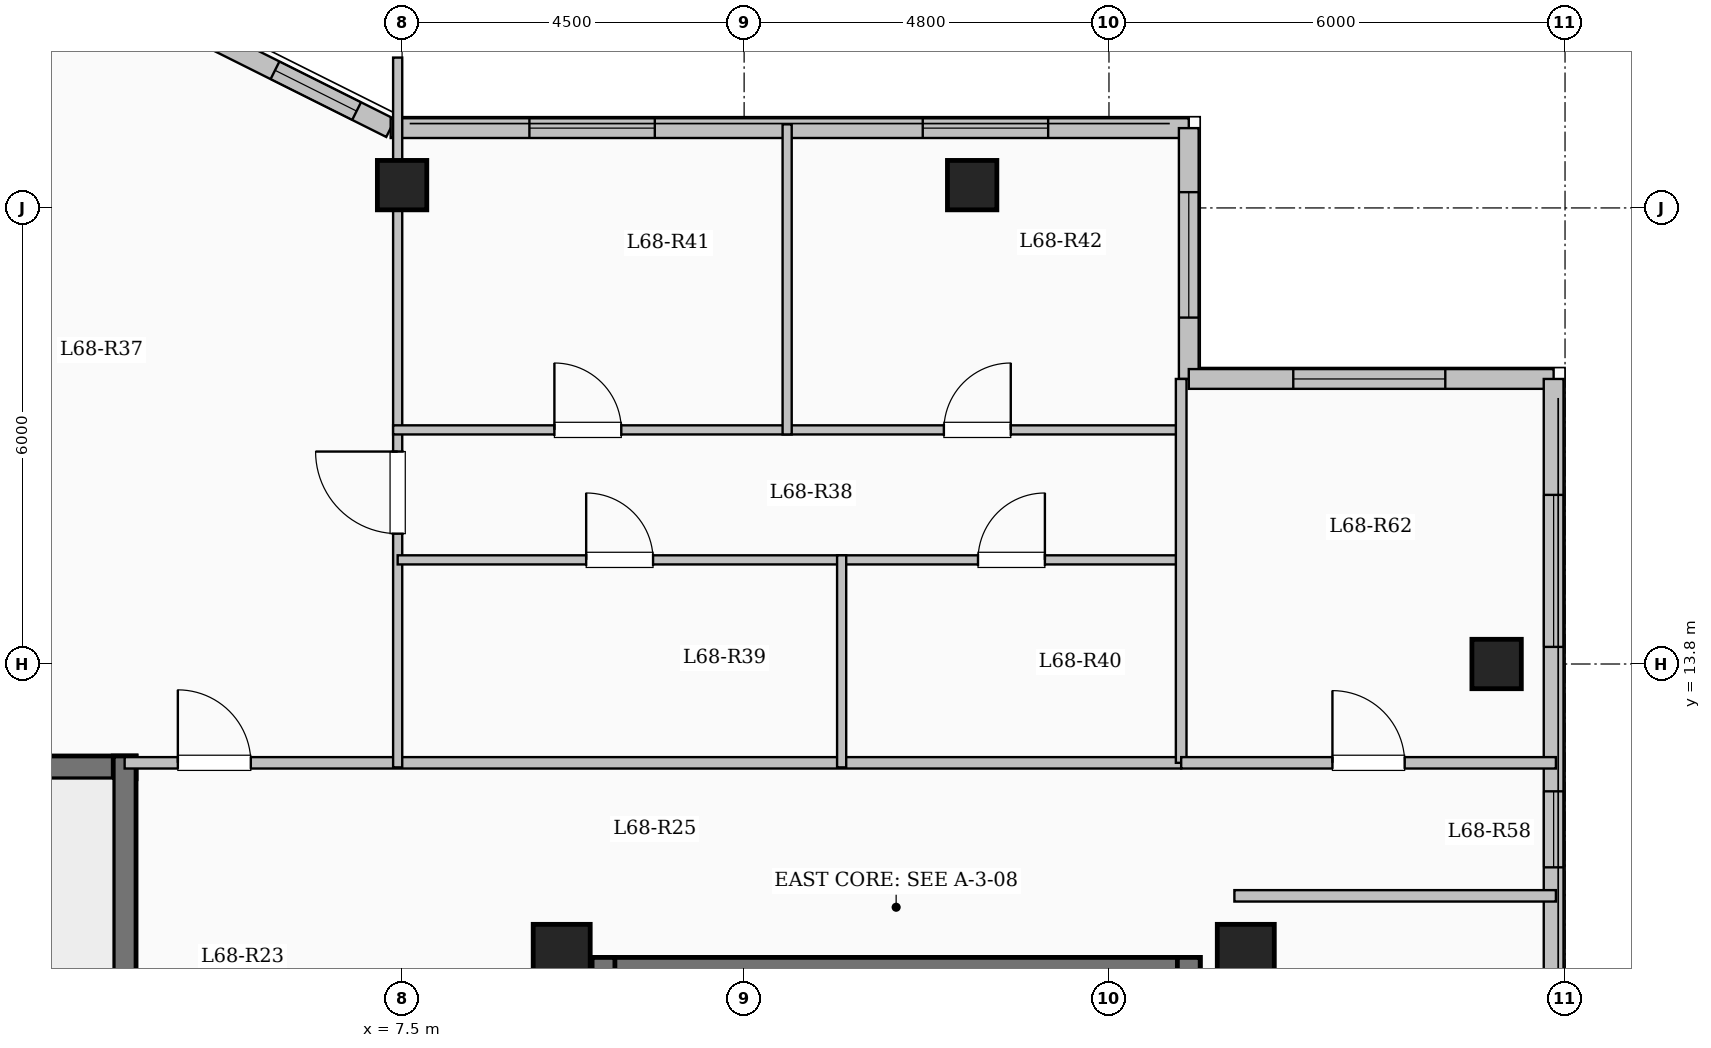
"""IFC4 building model, lengths in metres.
Left out: names, types, materials, properties, quantities, classifications, styles, units other than length and angle.
Written with IfcOpenShell. Run it as: python <this file> out.ifc"""

import sys

from ifc_helpers import new_model, si_unit, direction, frame, frame_2d, origin, origin_2d, place, context, subcontext, project, spatial, rectangle, extrude, element, fill, save


model = new_model("IFC4")
c1 = context("Model", 3, precision=1e-05, world=origin(), true_north=direction((0.0, 1.0)))
c2 = subcontext(c1, "Body", "Model", "MODEL_VIEW")
j1 = project(units=[si_unit("LENGTHUNIT", "METRE"), si_unit("PLANEANGLEUNIT", "RADIAN")], contexts=[c1])
p1 = place(None, origin())
s1 = spatial("IfcSite", under=j1, at=p1, CompositionType="ELEMENT")
p2 = place(p1, origin())
s2 = spatial("IfcBuilding", under=s1, at=p2, CompositionType="ELEMENT")
p3 = place(p2, frame((0.0, 0.0, 251.55)))
s3 = spatial("IfcBuildingStorey", under=s2, at=p3, CompositionType="ELEMENT", Elevation=251.55)
for number, where, z_axis, x_axis in (
    (1, (9.6, 10.0, 0.0), (0.0, 0.0, 1.0), (1.0, 0.0, 0.0)),
    (2, (18.6, 10.0, 0.0), (0.0, 0.0, 1.0), (1.0, 0.0, 0.0)),
):
    element("IfcColumn", number, at=place(p3, frame(where, z_axis=z_axis, x_axis=x_axis)), inside=s3, PredefinedType="COLUMN", context=c2, shape_type="SweptSolid", body=[
        extrude(rectangle(XDim=0.75, YDim=0.75, at=origin_2d()), origin(), (0.0, 0.0, 1.0), 3.35),
    ])
for number, where, z_axis, x_axis in (
    (3, (7.5, 20.1, 0.0), (0.0, 0.0, 1.0), (1.0, 0.0, 0.0)),
    (4, (15.0, 20.1, 0.0), (0.0, 0.0, 1.0), (1.0, 0.0, 0.0)),
    (5, (21.9, 13.8, 0.0), (0.0, 0.0, 1.0), (1.0, 0.0, 0.0)),
):
    element("IfcColumn", number, at=place(p3, frame(where, z_axis=z_axis, x_axis=x_axis)), inside=s3, PredefinedType="COLUMN", context=c2, shape_type="SweptSolid", body=[
        extrude(rectangle(XDim=0.65, YDim=0.65, at=origin_2d()), origin(), (0.0, 0.0, 1.0), 3.35),
    ])
p4 = place(p3, frame((4.35, 22.35, 0.0), z_axis=(0.0, 0.0, 1.0), x_axis=(0.894427191, -0.4472135955, 0.0)))
e6 = element("IfcWall", 6, at=p4, inside=s3, PredefinedType="SOLIDWALL", context=c2, shape_type="SweptSolid", body=[
    extrude(rectangle(XDim=3.354, YDim=0.26, at=frame_2d((1.677, 0.0))), origin(), (0.0, 0.0, 1.0), 3.1),
])
p5 = place(p4, frame((1.653, 0.0, 0.95)))
e7 = element("IfcOpeningElement", 7, at=p5, cuts=e6, PredefinedType="OPENING", context=c2, shape_type="SweptSolid", body=[
    extrude(rectangle(XDim=1.2, YDim=1.5, at=frame_2d((0.6, 0.75))), frame((0.0, 0.14, 0.0), z_axis=(0.0, -1.0, 0.0), x_axis=(1.0, 0.0, 0.0)), (0.0, 0.0, 1.0), 0.28),
])
p6 = place(p3, frame((7.35, 20.85, 0.0), z_axis=(0.0, 0.0, 1.0), x_axis=(1.0, 0.0, 0.0)))
e8 = element("IfcWall", 8, at=p6, inside=s3, PredefinedType="SOLIDWALL", context=c2, shape_type="SweptSolid", body=[
    extrude(rectangle(XDim=10.5, YDim=0.26, at=frame_2d((5.25, 0.0))), origin(), (0.0, 0.0, 1.0), 3.1),
])
p7 = place(p6, frame((1.825, 0.0, 0.9)))
e9 = element("IfcOpeningElement", 9, at=p7, cuts=e8, PredefinedType="OPENING", context=c2, shape_type="SweptSolid", body=[
    extrude(rectangle(XDim=1.65, YDim=1.6, at=frame_2d((0.825, 0.8))), frame((0.0, 0.14, 0.0), z_axis=(0.0, -1.0, 0.0), x_axis=(1.0, 0.0, 0.0)), (0.0, 0.0, 1.0), 0.28),
])
p8 = place(p6, frame((7.0, 0.0, 0.9)))
e10 = element("IfcOpeningElement", 10, at=p8, cuts=e8, PredefinedType="OPENING", context=c2, shape_type="SweptSolid", body=[
    extrude(rectangle(XDim=1.65, YDim=1.6, at=frame_2d((0.825, 0.8))), frame((0.0, 0.14, 0.0), z_axis=(0.0, -1.0, 0.0), x_axis=(1.0, 0.0, 0.0)), (0.0, 0.0, 1.0), 0.28),
])
p9 = place(p3, frame((17.85, 20.85, 0.0), z_axis=(0.0, 0.0, 1.0), x_axis=(0.0, -1.0, 0.0)))
e11 = element("IfcWall", 11, at=p9, inside=s3, PredefinedType="SOLIDWALL", context=c2, shape_type="SweptSolid", body=[
    extrude(rectangle(XDim=3.3, YDim=0.26, at=frame_2d((1.65, 0.0))), origin(), (0.0, 0.0, 1.0), 3.1),
])
p10 = place(p9, frame((0.843, 0.0, 0.9)))
e12 = element("IfcOpeningElement", 12, at=p10, cuts=e11, PredefinedType="OPENING", context=c2, shape_type="SweptSolid", body=[
    extrude(rectangle(XDim=1.65, YDim=1.6, at=frame_2d((0.825, 0.8))), frame((0.0, 0.14, 0.0), z_axis=(0.0, -1.0, 0.0), x_axis=(1.0, 0.0, 0.0)), (0.0, 0.0, 1.0), 0.28),
])
p11 = place(p3, frame((17.85, 17.55, 0.0), z_axis=(0.0, 0.0, 1.0), x_axis=(1.0, 0.0, 0.0)))
e13 = element("IfcWall", 13, at=p11, inside=s3, PredefinedType="SOLIDWALL", context=c2, shape_type="SweptSolid", body=[
    extrude(rectangle(XDim=4.8, YDim=0.26, at=frame_2d((2.4, 0.0))), origin(), (0.0, 0.0, 1.0), 3.1),
])
p12 = place(p11, frame((1.375, 0.0, 0.9)))
e14 = element("IfcOpeningElement", 14, at=p12, cuts=e13, PredefinedType="OPENING", context=c2, shape_type="SweptSolid", body=[
    extrude(rectangle(XDim=2.0, YDim=1.7, at=frame_2d((1.0, 0.85))), frame((0.0, 0.14, 0.0), z_axis=(0.0, -1.0, 0.0), x_axis=(1.0, 0.0, 0.0)), (0.0, 0.0, 1.0), 0.28),
])
p13 = place(p3, frame((22.65, 17.55, 0.0), z_axis=(0.0, 0.0, 1.0), x_axis=(0.0, -1.0, 0.0)))
e15 = element("IfcWall", 15, at=p13, inside=s3, PredefinedType="SOLIDWALL", context=c2, shape_type="SweptSolid", body=[
    extrude(rectangle(XDim=35.1, YDim=0.26, at=frame_2d((17.55, 0.0))), origin(), (0.0, 0.0, 1.0), 3.1),
])
p14 = place(p13, frame((1.525, 0.0, 0.9)))
e16 = element("IfcOpeningElement", 16, at=p14, cuts=e15, PredefinedType="OPENING", context=c2, shape_type="SweptSolid", body=[
    extrude(rectangle(XDim=2.0, YDim=1.7, at=frame_2d((1.0, 0.85))), frame((0.0, 0.14, 0.0), z_axis=(0.0, -1.0, 0.0), x_axis=(1.0, 0.0, 0.0)), (0.0, 0.0, 1.0), 0.28),
])
p15 = place(p13, frame((5.425, 0.0, 0.95)))
e17 = element("IfcOpeningElement", 17, at=p15, cuts=e15, PredefinedType="OPENING", context=c2, shape_type="SweptSolid", body=[
    extrude(rectangle(XDim=1.0, YDim=1.5, at=frame_2d((0.5, 0.75))), frame((0.0, 0.14, 0.0), z_axis=(0.0, -1.0, 0.0), x_axis=(1.0, 0.0, 0.0)), (0.0, 0.0, 1.0), 0.28),
])
p16 = place(p13, frame((14.8, 0.0, 0.9)))
e18 = element("IfcOpeningElement", 18, at=p16, cuts=e15, PredefinedType="OPENING", context=c2, shape_type="SweptSolid", body=[
    extrude(rectangle(XDim=2.0, YDim=1.7, at=frame_2d((1.0, 0.85))), frame((0.0, 0.14, 0.0), z_axis=(0.0, -1.0, 0.0), x_axis=(1.0, 0.0, 0.0)), (0.0, 0.0, 1.0), 0.28),
])
p17 = place(p13, frame((25.275, 0.0, 0.95)))
e19 = element("IfcOpeningElement", 19, at=p17, cuts=e15, PredefinedType="OPENING", context=c2, shape_type="SweptSolid", body=[
    extrude(rectangle(XDim=1.2, YDim=1.5, at=frame_2d((0.6, 0.75))), frame((0.0, 0.14, 0.0), z_axis=(0.0, -1.0, 0.0), x_axis=(1.0, 0.0, 0.0)), (0.0, 0.0, 1.0), 0.28),
])
p18 = place(p13, frame((29.925, 0.0, 0.9)))
e20 = element("IfcOpeningElement", 20, at=p18, cuts=e15, PredefinedType="OPENING", context=c2, shape_type="SweptSolid", body=[
    extrude(rectangle(XDim=2.2, YDim=1.75, at=frame_2d((1.1, 0.875))), frame((0.0, 0.14, 0.0), z_axis=(0.0, -1.0, 0.0), x_axis=(1.0, 0.0, 0.0)), (0.0, 0.0, 1.0), 0.28),
])
p19 = place(p3, frame((10.0, 9.79, 0.0), z_axis=(0.0, 0.0, 1.0), x_axis=(1.0, 0.0, 0.0)))
e21 = element("IfcWall", 21, at=p19, inside=s3, PredefinedType="SHEAR", context=c2, shape_type="SweptSolid", body=[
    extrude(rectangle(XDim=8.0, YDim=0.3, at=frame_2d((4.0, 0.0))), origin(), (0.0, 0.0, 1.0), 3.35),
])
for number, where, z_axis, x_axis in (
    (22, (10.15, 6.35, 0.0), (0.0, 0.0, 1.0), (0.0, 1.0, 0.0)),
    (23, (17.85, 6.35, 0.0), (0.0, 0.0, 1.0), (0.0, 1.0, 0.0)),
):
    element("IfcWall", number, at=place(p3, frame(where, z_axis=z_axis, x_axis=x_axis)), inside=s3, PredefinedType="SHEAR", context=c2, shape_type="SweptSolid", body=[
        extrude(rectangle(XDim=3.59, YDim=0.3, at=frame_2d((1.795, 0.0))), origin(), (0.0, 0.0, 1.0), 3.35),
    ])
p20 = place(p3, frame((-4.0, 12.44, 0.0), z_axis=(0.0, 0.0, 1.0), x_axis=(1.0, 0.0, 0.0)))
e24 = element("IfcWall", 24, at=p20, inside=s3, PredefinedType="SHEAR", context=c2, shape_type="SweptSolid", body=[
    extrude(rectangle(XDim=8.0, YDim=0.3, at=frame_2d((4.0, 0.0))), origin(), (0.0, 0.0, 1.0), 3.35),
])
p21 = place(p3, frame((3.85, 9.0, 0.0), z_axis=(0.0, 0.0, 1.0), x_axis=(0.0, 1.0, 0.0)))
e25 = element("IfcWall", 25, at=p21, inside=s3, PredefinedType="SHEAR", context=c2, shape_type="SweptSolid", body=[
    extrude(rectangle(XDim=3.59, YDim=0.3, at=frame_2d((1.795, 0.0))), origin(), (0.0, 0.0, 1.0), 3.35),
])
p22 = place(p3, frame((3.85, 12.5, 0.0), z_axis=(0.0, 0.0, 1.0), x_axis=(1.0, 0.0, 0.0)))
e26 = element("IfcWall", 26, at=p22, inside=s3, PredefinedType="PARTITIONING", context=c2, shape_type="SweptSolid", body=[
    extrude(rectangle(XDim=13.9, YDim=0.15, at=frame_2d((6.95, 0.0))), origin(), (0.0, 0.0, 1.0), 3.1),
])
p23 = place(p22, frame((0.7, 0.0, 0.0)))
e27 = element("IfcOpeningElement", 27, at=p23, cuts=e26, PredefinedType="OPENING", context=c2, shape_type="SweptSolid", body=[
    extrude(rectangle(XDim=0.96, YDim=2.15, at=frame_2d((0.48, 1.075))), frame((0.0, 0.085, 0.0), z_axis=(0.0, -1.0, 0.0), x_axis=(1.0, 0.0, 0.0)), (0.0, 0.0, 1.0), 0.17),
])
p24 = place(p3, frame((7.442, 12.44, 0.0), z_axis=(0.0, 0.0, 1.0), x_axis=(0.0, 1.0, 0.0)))
e28 = element("IfcWall", 28, at=p24, inside=s3, PredefinedType="PARTITIONING", context=c2, shape_type="SweptSolid", body=[
    extrude(rectangle(XDim=9.338, YDim=0.12, at=frame_2d((4.669, 0.0))), origin(), (0.0, 0.0, 1.0), 2.685),
])
p25 = place(p24, frame((3.075, 0.0, 0.0)))
e29 = element("IfcOpeningElement", 29, at=p25, cuts=e28, PredefinedType="OPENING", context=c2, shape_type="SweptSolid", body=[
    extrude(rectangle(XDim=1.08, YDim=2.15, at=frame_2d((0.54, 1.075))), frame((0.0, 0.07, 0.0), z_axis=(0.0, -1.0, 0.0), x_axis=(1.0, 0.0, 0.0)), (0.0, 0.0, 1.0), 0.14),
])
p26 = place(p3, frame((7.442, 15.17, 0.0), z_axis=(0.0, 0.0, 1.0), x_axis=(1.0, 0.0, 0.0)))
e30 = element("IfcWall", 30, at=p26, inside=s3, PredefinedType="PARTITIONING", context=c2, shape_type="SweptSolid", body=[
    extrude(rectangle(XDim=5.841, YDim=0.12, at=frame_2d((2.92, 0.0))), origin(), (0.0, 0.0, 1.0), 3.1),
])
p27 = place(p26, frame((2.48, 0.0, 0.0)))
e31 = element("IfcOpeningElement", 31, at=p27, cuts=e30, PredefinedType="OPENING", context=c2, shape_type="SweptSolid", body=[
    extrude(rectangle(XDim=0.88, YDim=2.1, at=frame_2d((0.44, 1.05))), frame((0.0, 0.07, 0.0), z_axis=(0.0, -1.0, 0.0), x_axis=(1.0, 0.0, 0.0)), (0.0, 0.0, 1.0), 0.14),
])
p28 = place(p3, frame((13.283, 15.17, 0.0), z_axis=(0.0, 0.0, 1.0), x_axis=(1.0, 0.0, 0.0)))
e32 = element("IfcWall", 32, at=p28, inside=s3, PredefinedType="PARTITIONING", context=c2, shape_type="SweptSolid", body=[
    extrude(rectangle(XDim=4.467, YDim=0.12, at=frame_2d((2.233, 0.0))), origin(), (0.0, 0.0, 1.0), 3.1),
])
p29 = place(p28, frame((1.794, 0.0, 0.0)))
e33 = element("IfcOpeningElement", 33, at=p29, cuts=e32, PredefinedType="OPENING", context=c2, shape_type="SweptSolid", body=[
    extrude(rectangle(XDim=0.88, YDim=2.1, at=frame_2d((0.44, 1.05))), frame((0.0, 0.07, 0.0), z_axis=(0.0, -1.0, 0.0), x_axis=(1.0, 0.0, 0.0)), (0.0, 0.0, 1.0), 0.14),
])
p30 = place(p3, frame((7.382, 16.88, 0.0), z_axis=(0.0, 0.0, 1.0), x_axis=(1.0, 0.0, 0.0)))
e34 = element("IfcWall", 34, at=p30, inside=s3, PredefinedType="PARTITIONING", context=c2, shape_type="SweptSolid", body=[
    extrude(rectangle(XDim=10.428, YDim=0.12, at=frame_2d((5.214, 0.0))), origin(), (0.0, 0.0, 1.0), 2.785),
])
p31 = place(p30, frame((2.122, 0.0, 0.0)))
e35 = element("IfcOpeningElement", 35, at=p31, cuts=e34, PredefinedType="OPENING", context=c2, shape_type="SweptSolid", body=[
    extrude(rectangle(XDim=0.88, YDim=2.1, at=frame_2d((0.44, 1.05))), frame((0.0, 0.07, 0.0), z_axis=(0.0, -1.0, 0.0), x_axis=(1.0, 0.0, 0.0)), (0.0, 0.0, 1.0), 0.14),
])
p32 = place(p30, frame((7.246, 0.0, 0.0)))
e36 = element("IfcOpeningElement", 36, at=p32, cuts=e34, PredefinedType="OPENING", context=c2, shape_type="SweptSolid", body=[
    extrude(rectangle(XDim=0.88, YDim=2.1, at=frame_2d((0.44, 1.05))), frame((0.0, 0.07, 0.0), z_axis=(0.0, -1.0, 0.0), x_axis=(1.0, 0.0, 0.0)), (0.0, 0.0, 1.0), 0.14),
])
p33 = place(p3, frame((13.283, 12.44, 0.0), z_axis=(0.0, 0.0, 1.0), x_axis=(0.0, 1.0, 0.0)))
e37 = element("IfcWall", 37, at=p33, inside=s3, PredefinedType="PARTITIONING", context=c2, shape_type="SweptSolid", body=[
    extrude(rectangle(XDim=2.79, YDim=0.12, at=frame_2d((1.395, 0.0))), origin(), (0.0, 0.0, 1.0), 3.1),
])
p34 = place(p3, frame((12.566, 16.82, 0.0), z_axis=(0.0, 0.0, 1.0), x_axis=(0.0, 1.0, 0.0)))
e38 = element("IfcWall", 38, at=p34, inside=s3, PredefinedType="PARTITIONING", context=c2, shape_type="SweptSolid", body=[
    extrude(rectangle(XDim=4.08, YDim=0.12, at=frame_2d((2.04, 0.0))), origin(), (0.0, 0.0, 1.0), 3.1),
])
p35 = place(p3, frame((18.45, 10.75, 0.0), z_axis=(0.0, 0.0, 1.0), x_axis=(1.0, 0.0, 0.0)))
e39 = element("IfcWall", 39, at=p35, inside=s3, PredefinedType="PARTITIONING", context=c2, shape_type="SweptSolid", body=[
    extrude(rectangle(XDim=4.23, YDim=0.15, at=frame_2d((2.115, 0.0))), origin(), (0.0, 0.0, 1.0), 3.1),
])
p36 = place(p3, frame((17.75, 12.5, 0.0), z_axis=(0.0, 0.0, 1.0), x_axis=(0.0, 1.0, 0.0)))
e40 = element("IfcWall", 40, at=p36, inside=s3, PredefinedType="PARTITIONING", context=c2, shape_type="SweptSolid", body=[
    extrude(rectangle(XDim=5.05, YDim=0.14, at=frame_2d((2.525, 0.0))), origin(), (0.0, 0.0, 1.0), 3.1),
])
p37 = place(p3, frame((17.75, 12.5, 0.0), z_axis=(0.0, 0.0, 1.0), x_axis=(1.0, 0.0, 0.0)))
e41 = element("IfcWall", 41, at=p37, inside=s3, PredefinedType="PARTITIONING", context=c2, shape_type="SweptSolid", body=[
    extrude(rectangle(XDim=4.93, YDim=0.15, at=frame_2d((2.465, 0.0))), origin(), (0.0, 0.0, 1.0), 3.1),
])
p38 = place(p37, frame((1.99, 0.0, 0.0)))
e42 = element("IfcOpeningElement", 42, at=p38, cuts=e41, PredefinedType="OPENING", context=c2, shape_type="SweptSolid", body=[
    extrude(rectangle(XDim=0.95, YDim=2.15, at=frame_2d((0.475, 1.075))), frame((0.0, 0.085, 0.0), z_axis=(0.0, -1.0, 0.0), x_axis=(1.0, 0.0, 0.0)), (0.0, 0.0, 1.0), 0.17),
])
p39 = place(p5, origin())
e43 = element("IfcWindow", 43, at=p39, inside=s3, PartitioningType="SINGLE_PANEL", PredefinedType="WINDOW", context=c2, shape_type="SweptSolid", body=[
    extrude(rectangle(XDim=1.2, YDim=1.5, at=frame_2d((0.6, 0.75))), frame((0.0, 0.03, 0.0), z_axis=(0.0, -1.0, 0.0), x_axis=(1.0, 0.0, 0.0)), (0.0, 0.0, 1.0), 0.06),
])
fill(e7, e43)
p40 = place(p7, origin())
e44 = element("IfcWindow", 44, at=p40, inside=s3, PartitioningType="SINGLE_PANEL", PredefinedType="WINDOW", context=c2, shape_type="SweptSolid", body=[
    extrude(rectangle(XDim=1.65, YDim=1.6, at=frame_2d((0.825, 0.8))), frame((0.0, 0.03, 0.0), z_axis=(0.0, -1.0, 0.0), x_axis=(1.0, 0.0, 0.0)), (0.0, 0.0, 1.0), 0.06),
])
fill(e9, e44)
p41 = place(p8, origin())
e45 = element("IfcWindow", 45, at=p41, inside=s3, PartitioningType="SINGLE_PANEL", PredefinedType="WINDOW", context=c2, shape_type="SweptSolid", body=[
    extrude(rectangle(XDim=1.65, YDim=1.6, at=frame_2d((0.825, 0.8))), frame((0.0, 0.03, 0.0), z_axis=(0.0, -1.0, 0.0), x_axis=(1.0, 0.0, 0.0)), (0.0, 0.0, 1.0), 0.06),
])
fill(e10, e45)
p42 = place(p10, origin())
e46 = element("IfcWindow", 46, at=p42, inside=s3, PartitioningType="SINGLE_PANEL", PredefinedType="WINDOW", context=c2, shape_type="SweptSolid", body=[
    extrude(rectangle(XDim=1.65, YDim=1.6, at=frame_2d((0.825, 0.8))), frame((0.0, 0.03, 0.0), z_axis=(0.0, -1.0, 0.0), x_axis=(1.0, 0.0, 0.0)), (0.0, 0.0, 1.0), 0.06),
])
fill(e12, e46)
p43 = place(p12, origin())
e47 = element("IfcWindow", 47, at=p43, inside=s3, PartitioningType="SINGLE_PANEL", PredefinedType="WINDOW", context=c2, shape_type="SweptSolid", body=[
    extrude(rectangle(XDim=2.0, YDim=1.7, at=frame_2d((1.0, 0.85))), frame((0.0, 0.03, 0.0), z_axis=(0.0, -1.0, 0.0), x_axis=(1.0, 0.0, 0.0)), (0.0, 0.0, 1.0), 0.06),
])
fill(e14, e47)
p44 = place(p14, origin())
e48 = element("IfcWindow", 48, at=p44, inside=s3, PartitioningType="SINGLE_PANEL", PredefinedType="WINDOW", context=c2, shape_type="SweptSolid", body=[
    extrude(rectangle(XDim=2.0, YDim=1.7, at=frame_2d((1.0, 0.85))), frame((0.0, 0.03, 0.0), z_axis=(0.0, -1.0, 0.0), x_axis=(1.0, 0.0, 0.0)), (0.0, 0.0, 1.0), 0.06),
])
fill(e16, e48)
p45 = place(p15, origin())
e49 = element("IfcWindow", 49, at=p45, inside=s3, PartitioningType="SINGLE_PANEL", PredefinedType="WINDOW", context=c2, shape_type="SweptSolid", body=[
    extrude(rectangle(XDim=1.0, YDim=1.5, at=frame_2d((0.5, 0.75))), frame((0.0, 0.03, 0.0), z_axis=(0.0, -1.0, 0.0), x_axis=(1.0, 0.0, 0.0)), (0.0, 0.0, 1.0), 0.06),
])
fill(e17, e49)
p46 = place(p23, origin())
e50 = element("IfcDoor", 50, at=p46, inside=s3, OperationType="SINGLE_SWING_LEFT", PredefinedType="DOOR", context=c2, shape_type="SweptSolid", body=[
    extrude(rectangle(XDim=0.96, YDim=2.15, at=frame_2d((0.48, 1.075))), frame((0.0, 0.025, 0.0), z_axis=(0.0, -1.0, 0.0), x_axis=(1.0, 0.0, 0.0)), (0.0, 0.0, 1.0), 0.05),
])
fill(e27, e50)
p47 = place(p25, origin())
e51 = element("IfcDoor", 51, at=p47, inside=s3, OperationType="SINGLE_SWING_RIGHT", PredefinedType="DOOR", context=c2, shape_type="SweptSolid", body=[
    extrude(rectangle(XDim=1.08, YDim=2.15, at=frame_2d((0.54, 1.075))), frame((0.0, 0.025, 0.0), z_axis=(0.0, -1.0, 0.0), x_axis=(1.0, 0.0, 0.0)), (0.0, 0.0, 1.0), 0.05),
])
fill(e29, e51)
p48 = place(p27, origin())
e52 = element("IfcDoor", 52, at=p48, inside=s3, OperationType="SINGLE_SWING_LEFT", PredefinedType="DOOR", context=c2, shape_type="SweptSolid", body=[
    extrude(rectangle(XDim=0.88, YDim=2.1, at=frame_2d((0.44, 1.05))), frame((0.0, 0.025, 0.0), z_axis=(0.0, -1.0, 0.0), x_axis=(1.0, 0.0, 0.0)), (0.0, 0.0, 1.0), 0.05),
])
fill(e31, e52)
p49 = place(p29, origin())
e53 = element("IfcDoor", 53, at=p49, inside=s3, OperationType="SINGLE_SWING_RIGHT", PredefinedType="DOOR", context=c2, shape_type="SweptSolid", body=[
    extrude(rectangle(XDim=0.88, YDim=2.1, at=frame_2d((0.44, 1.05))), frame((0.0, 0.025, 0.0), z_axis=(0.0, -1.0, 0.0), x_axis=(1.0, 0.0, 0.0)), (0.0, 0.0, 1.0), 0.05),
])
fill(e33, e53)
p50 = place(p31, origin())
e54 = element("IfcDoor", 54, at=p50, inside=s3, OperationType="SINGLE_SWING_LEFT", PredefinedType="DOOR", context=c2, shape_type="SweptSolid", body=[
    extrude(rectangle(XDim=0.88, YDim=2.1, at=frame_2d((0.44, 1.05))), frame((0.0, 0.025, 0.0), z_axis=(0.0, -1.0, 0.0), x_axis=(1.0, 0.0, 0.0)), (0.0, 0.0, 1.0), 0.05),
])
fill(e35, e54)
p51 = place(p32, origin())
e55 = element("IfcDoor", 55, at=p51, inside=s3, OperationType="SINGLE_SWING_RIGHT", PredefinedType="DOOR", context=c2, shape_type="SweptSolid", body=[
    extrude(rectangle(XDim=0.88, YDim=2.1, at=frame_2d((0.44, 1.05))), frame((0.0, 0.025, 0.0), z_axis=(0.0, -1.0, 0.0), x_axis=(1.0, 0.0, 0.0)), (0.0, 0.0, 1.0), 0.05),
])
fill(e36, e55)
p52 = place(p38, origin())
e56 = element("IfcDoor", 56, at=p52, inside=s3, OperationType="SINGLE_SWING_LEFT", PredefinedType="DOOR", context=c2, shape_type="SweptSolid", body=[
    extrude(rectangle(XDim=0.95, YDim=2.15, at=frame_2d((0.475, 1.075))), frame((0.0, 0.025, 0.0), z_axis=(0.0, -1.0, 0.0), x_axis=(1.0, 0.0, 0.0)), (0.0, 0.0, 1.0), 0.05),
])
fill(e42, e56)
save(model, sys.argv[1])
